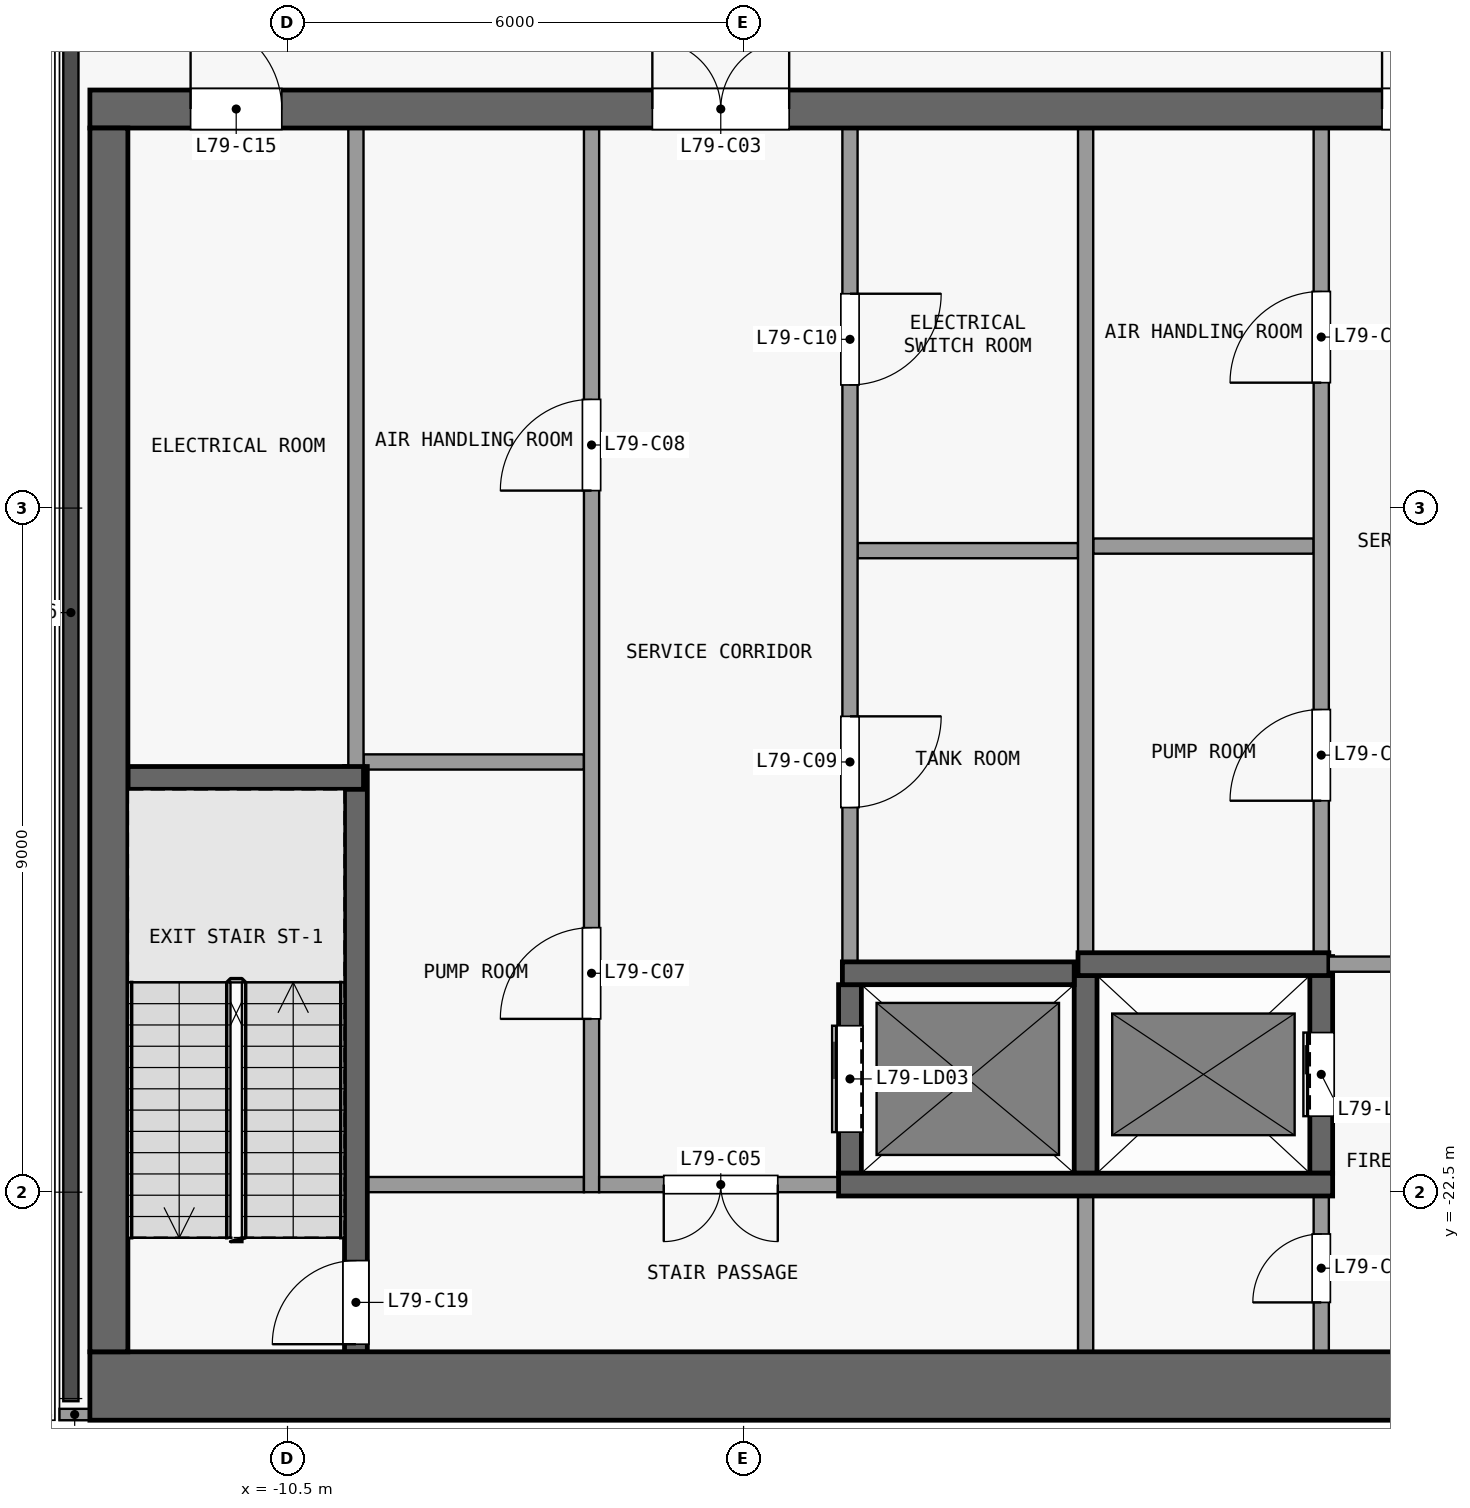
"""IFC4 building model, lengths in metres.
Left out: names, types, materials, properties, quantities, classifications, styles, units other than length and angle.
Written with IfcOpenShell. Run it as: python <this file> out.ifc"""

import sys

from ifc_helpers import new_model, si_unit, direction, frame, frame_2d, origin, place, context, subcontext, project, spatial, rectangle, extrude, element, fill, save


model = new_model("IFC4")
c1 = context("Model", 3, precision=1e-05, world=origin(), true_north=direction((0.0, 1.0)))
c2 = subcontext(c1, "Body", "Model", "MODEL_VIEW")
j1 = project(units=[si_unit("LENGTHUNIT", "METRE"), si_unit("PLANEANGLEUNIT", "RADIAN")], contexts=[c1])
p1 = place(None, origin())
s1 = spatial("IfcSite", under=j1, at=p1, CompositionType="ELEMENT")
p2 = place(p1, origin())
s2 = spatial("IfcBuilding", under=s1, at=p2, CompositionType="ELEMENT")
p3 = place(p2, frame((0.0, 0.0, 312.2)))
s3 = spatial("IfcBuildingStorey", under=s2, at=p3, CompositionType="ELEMENT", Elevation=312.2)
p4 = place(p3, frame((-13.1, -25.05, 0.0), z_axis=(0.0, 0.0, 1.0), x_axis=(1.0, 0.0, 0.0)))
e1 = element("IfcWall", 1, at=p4, inside=s3, PredefinedType="SHEAR", context=c2, shape_type="SweptSolid", body=[
    extrude(rectangle(XDim=26.2, YDim=0.9, at=frame_2d((13.1, 0.0))), origin(), (0.0, 0.0, 1.0), 4.2),
])
p5 = place(p3, frame((-13.1, -8.25, 0.0), z_axis=(0.0, 0.0, 1.0), x_axis=(1.0, 0.0, 0.0)))
e2 = element("IfcWall", 2, at=p5, inside=s3, PredefinedType="SHEAR", context=c2, shape_type="SweptSolid", body=[
    extrude(rectangle(XDim=26.2, YDim=0.5, at=frame_2d((13.1, 0.0))), origin(), (0.0, 0.0, 1.0), 4.2),
])
p6 = place(p5, frame((7.4, 0.0, 0.0)))
e3 = element("IfcOpeningElement", 3, at=p6, cuts=e2, PredefinedType="OPENING", context=c2, shape_type="SweptSolid", body=[
    extrude(rectangle(XDim=1.8, YDim=2.1, at=frame_2d((0.9, 1.05))), frame((0.0, 0.26, 0.0), z_axis=(0.0, -1.0, 0.0), x_axis=(1.0, 0.0, 0.0)), (0.0, 0.0, 1.0), 0.52),
])
p7 = place(p5, frame((17.0, 0.0, 0.0)))
e4 = element("IfcOpeningElement", 4, at=p7, cuts=e2, PredefinedType="OPENING", context=c2, shape_type="SweptSolid", body=[
    extrude(rectangle(XDim=1.8, YDim=2.1, at=frame_2d((0.9, 1.05))), frame((0.0, 0.26, 0.0), z_axis=(0.0, -1.0, 0.0), x_axis=(1.0, 0.0, 0.0)), (0.0, 0.0, 1.0), 0.52),
])
p8 = place(p5, frame((1.325, 0.0, 0.0)))
e5 = element("IfcOpeningElement", 5, at=p8, cuts=e2, PredefinedType="OPENING", context=c2, shape_type="SweptSolid", body=[
    extrude(rectangle(XDim=1.2, YDim=2.1, at=frame_2d((0.6, 1.05))), frame((0.0, 0.26, 0.0), z_axis=(0.0, -1.0, 0.0), x_axis=(1.0, 0.0, 0.0)), (0.0, 0.0, 1.0), 0.52),
])
p9 = place(p5, frame((22.975, 0.0, 0.0)))
e6 = element("IfcOpeningElement", 6, at=p9, cuts=e2, PredefinedType="OPENING", context=c2, shape_type="SweptSolid", body=[
    extrude(rectangle(XDim=0.9, YDim=2.1, at=frame_2d((0.45, 1.05))), frame((0.0, 0.26, 0.0), z_axis=(0.0, -1.0, 0.0), x_axis=(1.0, 0.0, 0.0)), (0.0, 0.0, 1.0), 0.52),
])
p10 = place(p3, frame((-12.85, -24.6, 0.0), z_axis=(0.0, 0.0, 1.0), x_axis=(0.0, 1.0, 0.0)))
e7 = element("IfcWall", 7, at=p10, inside=s3, PredefinedType="SHEAR", context=c2, shape_type="SweptSolid", body=[
    extrude(rectangle(XDim=16.1, YDim=0.5, at=frame_2d((8.05, 0.0))), origin(), (0.0, 0.0, 1.0), 4.2),
])
p11 = place(p3, frame((-9.45, -22.4, 0.0), z_axis=(0.0, 0.0, 1.0), x_axis=(1.0, 0.0, 0.0)))
e8 = element("IfcWall", 8, at=p11, inside=s3, PredefinedType="PARTITIONING", context=c2, shape_type="SweptSolid", body=[
    extrude(rectangle(XDim=2.85, YDim=0.2, at=frame_2d((1.425, 0.0))), origin(), (0.0, 0.0, 1.0), 4.2),
])
p12 = place(p3, frame((-3.25, -22.4, 0.0), z_axis=(0.0, 0.0, 1.0), x_axis=(-1.0, 0.0, 0.0)))
e9 = element("IfcWall", 9, at=p12, inside=s3, PredefinedType="PARTITIONING", context=c2, shape_type="SweptSolid", body=[
    extrude(rectangle(XDim=3.15, YDim=0.2, at=frame_2d((1.575, 0.0))), origin(), (0.0, 0.0, 1.0), 4.2),
])
p13 = place(p12, frame((0.8, 0.0, 0.0)))
e10 = element("IfcOpeningElement", 10, at=p13, cuts=e9, PredefinedType="OPENING", context=c2, shape_type="SweptSolid", body=[
    extrude(rectangle(XDim=1.5, YDim=2.1, at=frame_2d((0.75, 1.05))), frame((0.0, 0.11, 0.0), z_axis=(0.0, -1.0, 0.0), x_axis=(1.0, 0.0, 0.0)), (0.0, 0.0, 1.0), 0.22),
])
p14 = place(p3, frame((-3.25, -22.4, 0.0), z_axis=(0.0, 0.0, 1.0), x_axis=(1.0, 0.0, 0.0)))
e11 = element("IfcWall", 11, at=p14, inside=s3, PredefinedType="SHEAR", context=c2, shape_type="SweptSolid", body=[
    extrude(rectangle(XDim=6.5, YDim=0.3, at=frame_2d((3.25, 0.0))), origin(), (0.0, 0.0, 1.0), 4.2),
])
p15 = place(p3, frame((-3.2, -19.62, 0.0), z_axis=(0.0, 0.0, 1.0), x_axis=(1.0, 0.0, 0.0)))
e12 = element("IfcWall", 12, at=p15, inside=s3, PredefinedType="SHEAR", context=c2, shape_type="SweptSolid", body=[
    extrude(rectangle(XDim=3.05, YDim=0.3, at=frame_2d((1.525, 0.0))), origin(), (0.0, 0.0, 1.0), 4.2),
])
p16 = place(p3, frame((-0.1, -19.5, 0.0), z_axis=(0.0, 0.0, 1.0), x_axis=(1.0, 0.0, 0.0)))
e13 = element("IfcWall", 13, at=p16, inside=s3, PredefinedType="SHEAR", context=c2, shape_type="SweptSolid", body=[
    extrude(rectangle(XDim=3.3, YDim=0.3, at=frame_2d((1.65, 0.0))), origin(), (0.0, 0.0, 1.0), 4.2),
])
p17 = place(p3, frame((6.4, -19.5, 0.0), z_axis=(0.0, 0.0, 1.0), x_axis=(-1.0, 0.0, 0.0)))
e14 = element("IfcWall", 14, at=p17, inside=s3, PredefinedType="PARTITIONING", context=c2, shape_type="SweptSolid", body=[
    extrude(rectangle(XDim=3.2, YDim=0.2, at=frame_2d((1.6, 0.0))), origin(), (0.0, 0.0, 1.0), 4.2),
])
p18 = place(p17, frame((0.85, 0.0, 0.0)))
e15 = element("IfcOpeningElement", 15, at=p18, cuts=e14, PredefinedType="OPENING", context=c2, shape_type="SweptSolid", body=[
    extrude(rectangle(XDim=1.5, YDim=2.1, at=frame_2d((0.75, 1.05))), frame((0.0, 0.11, 0.0), z_axis=(0.0, -1.0, 0.0), x_axis=(1.0, 0.0, 0.0)), (0.0, 0.0, 1.0), 0.22),
])
p19 = place(p3, frame((-12.6, -17.05, 0.0), z_axis=(0.0, 0.0, 1.0), x_axis=(1.0, 0.0, 0.0)))
e16 = element("IfcWall", 16, at=p19, inside=s3, PredefinedType="SHEAR", context=c2, shape_type="SweptSolid", body=[
    extrude(rectangle(XDim=3.1, YDim=0.3, at=frame_2d((1.55, 0.0))), origin(), (0.0, 0.0, 1.0), 4.2),
])
for number, where, z_axis, x_axis in (
    (17, (-9.5, -16.84, 0.0), (0.0, 0.0, 1.0), (1.0, 0.0, 0.0)),
    (18, (-3.0, -14.06, 0.0), (0.0, 0.0, 1.0), (1.0, 0.0, 0.0)),
    (19, (0.1, -14.0, 0.0), (0.0, 0.0, 1.0), (1.0, 0.0, 0.0)),
):
    element("IfcWall", number, at=place(p3, frame(where, z_axis=z_axis, x_axis=x_axis)), inside=s3, PredefinedType="PARTITIONING", context=c2, shape_type="SweptSolid", body=[
        extrude(rectangle(XDim=2.9, YDim=0.2, at=frame_2d((1.45, 0.0))), origin(), (0.0, 0.0, 1.0), 4.2),
    ])
p20 = place(p3, frame((-9.6, -24.6, 0.0), z_axis=(0.0, 0.0, 1.0), x_axis=(0.0, 1.0, 0.0)))
e20 = element("IfcWall", 20, at=p20, inside=s3, PredefinedType="SHEAR", context=c2, shape_type="SweptSolid", body=[
    extrude(rectangle(XDim=7.7, YDim=0.3, at=frame_2d((3.85, 0.0))), origin(), (0.0, 0.0, 1.0), 4.2),
])
p21 = place(p20, frame((0.1, 0.0, 0.0)))
e21 = element("IfcOpeningElement", 21, at=p21, cuts=e20, PredefinedType="OPENING", context=c2, shape_type="SweptSolid", body=[
    extrude(rectangle(XDim=1.1, YDim=2.1, at=frame_2d((0.55, 1.05))), frame((0.0, 0.16, 0.0), z_axis=(0.0, -1.0, 0.0), x_axis=(1.0, 0.0, 0.0)), (0.0, 0.0, 1.0), 0.32),
])
p22 = place(p3, frame((-9.6, -16.9, 0.0), z_axis=(0.0, 0.0, 1.0), x_axis=(0.0, 1.0, 0.0)))
e22 = element("IfcWall", 22, at=p22, inside=s3, PredefinedType="PARTITIONING", context=c2, shape_type="SweptSolid", body=[
    extrude(rectangle(XDim=8.4, YDim=0.2, at=frame_2d((4.2, 0.0))), origin(), (0.0, 0.0, 1.0), 4.2),
])
p23 = place(p3, frame((-6.5, -22.5, 0.0), z_axis=(0.0, 0.0, 1.0), x_axis=(0.0, 1.0, 0.0)))
e23 = element("IfcWall", 23, at=p23, inside=s3, PredefinedType="PARTITIONING", context=c2, shape_type="SweptSolid", body=[
    extrude(rectangle(XDim=14.0, YDim=0.2, at=frame_2d((7.0, 0.0))), origin(), (0.0, 0.0, 1.0), 4.2),
])
p24 = place(p23, frame((2.28, 0.0, 0.0)))
e24 = element("IfcOpeningElement", 24, at=p24, cuts=e23, PredefinedType="OPENING", context=c2, shape_type="SweptSolid", body=[
    extrude(rectangle(XDim=1.2, YDim=2.1, at=frame_2d((0.6, 1.05))), frame((0.0, 0.11, 0.0), z_axis=(0.0, -1.0, 0.0), x_axis=(1.0, 0.0, 0.0)), (0.0, 0.0, 1.0), 0.22),
])
p25 = place(p23, frame((9.23, 0.0, 0.0)))
e25 = element("IfcOpeningElement", 25, at=p25, cuts=e23, PredefinedType="OPENING", context=c2, shape_type="SweptSolid", body=[
    extrude(rectangle(XDim=1.2, YDim=2.1, at=frame_2d((0.6, 1.05))), frame((0.0, 0.11, 0.0), z_axis=(0.0, -1.0, 0.0), x_axis=(1.0, 0.0, 0.0)), (0.0, 0.0, 1.0), 0.22),
])
p26 = place(p3, frame((-3.1, -22.25, 0.0), z_axis=(0.0, 0.0, 1.0), x_axis=(0.0, 1.0, 0.0)))
e26 = element("IfcWall", 26, at=p26, inside=s3, PredefinedType="SHEAR", context=c2, shape_type="SweptSolid", body=[
    extrude(rectangle(XDim=2.48, YDim=0.3, at=frame_2d((1.24, 0.0))), origin(), (0.0, 0.0, 1.0), 4.2),
])
p27 = place(p26, frame((0.54, 0.0, 0.0)))
e27 = element("IfcOpeningElement", 27, at=p27, cuts=e26, PredefinedType="OPENING", context=c2, shape_type="SweptSolid", body=[
    extrude(rectangle(XDim=1.4, YDim=2.1, at=frame_2d((0.7, 1.05))), frame((0.0, 0.16, 0.0), z_axis=(0.0, -1.0, 0.0), x_axis=(1.0, 0.0, 0.0)), (0.0, 0.0, 1.0), 0.32),
])
p28 = place(p3, frame((-3.1, -8.5, 0.0), z_axis=(0.0, 0.0, 1.0), x_axis=(0.0, -1.0, 0.0)))
e28 = element("IfcWall", 28, at=p28, inside=s3, PredefinedType="PARTITIONING", context=c2, shape_type="SweptSolid", body=[
    extrude(rectangle(XDim=10.97, YDim=0.2, at=frame_2d((5.485, 0.0))), origin(), (0.0, 0.0, 1.0), 4.2),
])
p29 = place(p28, frame((7.74, 0.0, 0.0)))
e29 = element("IfcOpeningElement", 29, at=p29, cuts=e28, PredefinedType="OPENING", context=c2, shape_type="SweptSolid", body=[
    extrude(rectangle(XDim=1.2, YDim=2.1, at=frame_2d((0.6, 1.05))), frame((0.0, 0.11, 0.0), z_axis=(0.0, -1.0, 0.0), x_axis=(1.0, 0.0, 0.0)), (0.0, 0.0, 1.0), 0.22),
])
p30 = place(p28, frame((2.18, 0.0, 0.0)))
e30 = element("IfcOpeningElement", 30, at=p30, cuts=e28, PredefinedType="OPENING", context=c2, shape_type="SweptSolid", body=[
    extrude(rectangle(XDim=1.2, YDim=2.1, at=frame_2d((0.6, 1.05))), frame((0.0, 0.11, 0.0), z_axis=(0.0, -1.0, 0.0), x_axis=(1.0, 0.0, 0.0)), (0.0, 0.0, 1.0), 0.22),
])
p31 = place(p3, frame((0.0, -24.6, 0.0), z_axis=(0.0, 0.0, 1.0), x_axis=(0.0, 1.0, 0.0)))
e31 = element("IfcWall", 31, at=p31, inside=s3, PredefinedType="PARTITIONING", context=c2, shape_type="SweptSolid", body=[
    extrude(rectangle(XDim=2.05, YDim=0.2, at=frame_2d((1.025, 0.0))), origin(), (0.0, 0.0, 1.0), 4.2),
])
p32 = place(p3, frame((0.0, -22.25, 0.0), z_axis=(0.0, 0.0, 1.0), x_axis=(0.0, 1.0, 0.0)))
e32 = element("IfcWall", 32, at=p32, inside=s3, PredefinedType="SHEAR", context=c2, shape_type="SweptSolid", body=[
    extrude(rectangle(XDim=2.6, YDim=0.3, at=frame_2d((1.3, 0.0))), origin(), (0.0, 0.0, 1.0), 4.2),
])
p33 = place(p3, frame((0.0, -19.35, 0.0), z_axis=(0.0, 0.0, 1.0), x_axis=(0.0, 1.0, 0.0)))
e33 = element("IfcWall", 33, at=p33, inside=s3, PredefinedType="PARTITIONING", context=c2, shape_type="SweptSolid", body=[
    extrude(rectangle(XDim=10.85, YDim=0.2, at=frame_2d((5.425, 0.0))), origin(), (0.0, 0.0, 1.0), 4.2),
])
p34 = place(p3, frame((3.1, -24.6, 0.0), z_axis=(0.0, 0.0, 1.0), x_axis=(0.0, 1.0, 0.0)))
e34 = element("IfcWall", 34, at=p34, inside=s3, PredefinedType="PARTITIONING", context=c2, shape_type="SweptSolid", body=[
    extrude(rectangle(XDim=2.05, YDim=0.2, at=frame_2d((1.025, 0.0))), origin(), (0.0, 0.0, 1.0), 4.2),
])
p35 = place(p34, frame((0.65, 0.0, 0.0)))
e35 = element("IfcOpeningElement", 35, at=p35, cuts=e34, PredefinedType="OPENING", context=c2, shape_type="SweptSolid", body=[
    extrude(rectangle(XDim=0.9, YDim=2.1, at=frame_2d((0.45, 1.05))), frame((0.0, 0.11, 0.0), z_axis=(0.0, -1.0, 0.0), x_axis=(1.0, 0.0, 0.0)), (0.0, 0.0, 1.0), 0.22),
])
p36 = place(p3, frame((3.1, -22.25, 0.0), z_axis=(0.0, 0.0, 1.0), x_axis=(0.0, 1.0, 0.0)))
e36 = element("IfcWall", 36, at=p36, inside=s3, PredefinedType="SHEAR", context=c2, shape_type="SweptSolid", body=[
    extrude(rectangle(XDim=2.85, YDim=0.3, at=frame_2d((1.425, 0.0))), origin(), (0.0, 0.0, 1.0), 4.2),
])
p37 = place(p36, frame((0.75, 0.0, 0.0)))
e37 = element("IfcOpeningElement", 37, at=p37, cuts=e36, PredefinedType="OPENING", context=c2, shape_type="SweptSolid", body=[
    extrude(rectangle(XDim=1.1, YDim=2.1, at=frame_2d((0.55, 1.05))), frame((0.0, 0.16, 0.0), z_axis=(0.0, -1.0, 0.0), x_axis=(1.0, 0.0, 0.0)), (0.0, 0.0, 1.0), 0.32),
])
p38 = place(p3, frame((3.1, -19.6, 0.0), z_axis=(0.0, 0.0, 1.0), x_axis=(0.0, 1.0, 0.0)))
e38 = element("IfcWall", 38, at=p38, inside=s3, PredefinedType="PARTITIONING", context=c2, shape_type="SweptSolid", body=[
    extrude(rectangle(XDim=11.1, YDim=0.2, at=frame_2d((5.55, 0.0))), origin(), (0.0, 0.0, 1.0), 4.2),
])
p39 = place(p38, frame((2.25, 0.0, 0.0)))
e39 = element("IfcOpeningElement", 39, at=p39, cuts=e38, PredefinedType="OPENING", context=c2, shape_type="SweptSolid", body=[
    extrude(rectangle(XDim=1.2, YDim=2.1, at=frame_2d((0.6, 1.05))), frame((0.0, 0.11, 0.0), z_axis=(0.0, -1.0, 0.0), x_axis=(1.0, 0.0, 0.0)), (0.0, 0.0, 1.0), 0.22),
])
p40 = place(p38, frame((7.75, 0.0, 0.0)))
e40 = element("IfcOpeningElement", 40, at=p40, cuts=e38, PredefinedType="OPENING", context=c2, shape_type="SweptSolid", body=[
    extrude(rectangle(XDim=1.2, YDim=2.1, at=frame_2d((0.6, 1.05))), frame((0.0, 0.11, 0.0), z_axis=(0.0, -1.0, 0.0), x_axis=(1.0, 0.0, 0.0)), (0.0, 0.0, 1.0), 0.22),
])
p41 = place(p3, frame((-13.1, -25.425, 0.0), z_axis=(0.0, 0.0, 1.0), x_axis=(-1.0, 0.0, 0.0)))
e41 = element("IfcWall", 41, at=p41, inside=s3, PredefinedType="SOLIDWALL", context=c2, shape_type="SweptSolid", body=[
    extrude(rectangle(XDim=0.4, YDim=0.15, at=frame_2d((0.2, 0.0))), origin(), (0.0, 0.0, 1.0), 4.2),
])
p42 = place(p37, origin())
e42 = element("IfcDoor", 42, at=p42, inside=s3, OperationType="DOUBLE_DOOR_SLIDING", PredefinedType="DOOR", context=c2, shape_type="SweptSolid", body=[
    extrude(rectangle(XDim=1.1, YDim=2.1, at=frame_2d((0.55, 1.05))), frame((0.0, 0.025, 0.0), z_axis=(0.0, -1.0, 0.0), x_axis=(1.0, 0.0, 0.0)), (0.0, 0.0, 1.0), 0.05),
])
fill(e37, e42)
p43 = place(p27, origin())
e43 = element("IfcDoor", 43, at=p43, inside=s3, OperationType="DOUBLE_DOOR_SLIDING", PredefinedType="DOOR", context=c2, shape_type="SweptSolid", body=[
    extrude(rectangle(XDim=1.4, YDim=2.1, at=frame_2d((0.7, 1.05))), frame((0.0, 0.025, 0.0), z_axis=(0.0, -1.0, 0.0), x_axis=(1.0, 0.0, 0.0)), (0.0, 0.0, 1.0), 0.05),
])
fill(e27, e43)
p44 = place(p6, origin())
e44 = element("IfcDoor", 44, at=p44, inside=s3, OperationType="DOUBLE_DOOR_SINGLE_SWING", PredefinedType="DOOR", context=c2, shape_type="SweptSolid", body=[
    extrude(rectangle(XDim=1.8, YDim=2.1, at=frame_2d((0.9, 1.05))), frame((0.0, 0.025, 0.0), z_axis=(0.0, -1.0, 0.0), x_axis=(1.0, 0.0, 0.0)), (0.0, 0.0, 1.0), 0.05),
])
fill(e3, e44)
p45 = place(p7, origin())
e45 = element("IfcDoor", 45, at=p45, inside=s3, OperationType="DOUBLE_DOOR_SINGLE_SWING", PredefinedType="DOOR", context=c2, shape_type="SweptSolid", body=[
    extrude(rectangle(XDim=1.8, YDim=2.1, at=frame_2d((0.9, 1.05))), frame((0.0, 0.025, 0.0), z_axis=(0.0, -1.0, 0.0), x_axis=(1.0, 0.0, 0.0)), (0.0, 0.0, 1.0), 0.05),
])
fill(e4, e45)
p46 = place(p13, origin())
e46 = element("IfcDoor", 46, at=p46, inside=s3, OperationType="DOUBLE_DOOR_SINGLE_SWING", PredefinedType="DOOR", context=c2, shape_type="SweptSolid", body=[
    extrude(rectangle(XDim=1.5, YDim=2.1, at=frame_2d((0.75, 1.05))), frame((0.0, 0.025, 0.0), z_axis=(0.0, -1.0, 0.0), x_axis=(1.0, 0.0, 0.0)), (0.0, 0.0, 1.0), 0.05),
])
fill(e10, e46)
p47 = place(p24, origin())
e47 = element("IfcDoor", 47, at=p47, inside=s3, OperationType="SINGLE_SWING_LEFT", PredefinedType="DOOR", context=c2, shape_type="SweptSolid", body=[
    extrude(rectangle(XDim=1.2, YDim=2.1, at=frame_2d((0.6, 1.05))), frame((0.0, 0.025, 0.0), z_axis=(0.0, -1.0, 0.0), x_axis=(1.0, 0.0, 0.0)), (0.0, 0.0, 1.0), 0.05),
])
fill(e24, e47)
p48 = place(p25, origin())
e48 = element("IfcDoor", 48, at=p48, inside=s3, OperationType="SINGLE_SWING_LEFT", PredefinedType="DOOR", context=c2, shape_type="SweptSolid", body=[
    extrude(rectangle(XDim=1.2, YDim=2.1, at=frame_2d((0.6, 1.05))), frame((0.0, 0.025, 0.0), z_axis=(0.0, -1.0, 0.0), x_axis=(1.0, 0.0, 0.0)), (0.0, 0.0, 1.0), 0.05),
])
fill(e25, e48)
p49 = place(p29, origin())
e49 = element("IfcDoor", 49, at=p49, inside=s3, OperationType="SINGLE_SWING_LEFT", PredefinedType="DOOR", context=c2, shape_type="SweptSolid", body=[
    extrude(rectangle(XDim=1.2, YDim=2.1, at=frame_2d((0.6, 1.05))), frame((0.0, 0.025, 0.0), z_axis=(0.0, -1.0, 0.0), x_axis=(1.0, 0.0, 0.0)), (0.0, 0.0, 1.0), 0.05),
])
fill(e29, e49)
p50 = place(p30, origin())
e50 = element("IfcDoor", 50, at=p50, inside=s3, OperationType="SINGLE_SWING_LEFT", PredefinedType="DOOR", context=c2, shape_type="SweptSolid", body=[
    extrude(rectangle(XDim=1.2, YDim=2.1, at=frame_2d((0.6, 1.05))), frame((0.0, 0.025, 0.0), z_axis=(0.0, -1.0, 0.0), x_axis=(1.0, 0.0, 0.0)), (0.0, 0.0, 1.0), 0.05),
])
fill(e30, e50)
p51 = place(p39, origin())
e51 = element("IfcDoor", 51, at=p51, inside=s3, OperationType="SINGLE_SWING_LEFT", PredefinedType="DOOR", context=c2, shape_type="SweptSolid", body=[
    extrude(rectangle(XDim=1.2, YDim=2.1, at=frame_2d((0.6, 1.05))), frame((0.0, 0.025, 0.0), z_axis=(0.0, -1.0, 0.0), x_axis=(1.0, 0.0, 0.0)), (0.0, 0.0, 1.0), 0.05),
])
fill(e39, e51)
p52 = place(p40, origin())
e52 = element("IfcDoor", 52, at=p52, inside=s3, OperationType="SINGLE_SWING_LEFT", PredefinedType="DOOR", context=c2, shape_type="SweptSolid", body=[
    extrude(rectangle(XDim=1.2, YDim=2.1, at=frame_2d((0.6, 1.05))), frame((0.0, 0.025, 0.0), z_axis=(0.0, -1.0, 0.0), x_axis=(1.0, 0.0, 0.0)), (0.0, 0.0, 1.0), 0.05),
])
fill(e40, e52)
p53 = place(p8, origin())
e53 = element("IfcDoor", 53, at=p53, inside=s3, OperationType="SINGLE_SWING_LEFT", PredefinedType="DOOR", context=c2, shape_type="SweptSolid", body=[
    extrude(rectangle(XDim=1.2, YDim=2.1, at=frame_2d((0.6, 1.05))), frame((0.0, 0.025, 0.0), z_axis=(0.0, -1.0, 0.0), x_axis=(1.0, 0.0, 0.0)), (0.0, 0.0, 1.0), 0.05),
])
fill(e5, e53)
p54 = place(p35, origin())
e54 = element("IfcDoor", 54, at=p54, inside=s3, OperationType="SINGLE_SWING_LEFT", PredefinedType="DOOR", context=c2, shape_type="SweptSolid", body=[
    extrude(rectangle(XDim=0.9, YDim=2.1, at=frame_2d((0.45, 1.05))), frame((0.0, 0.025, 0.0), z_axis=(0.0, -1.0, 0.0), x_axis=(1.0, 0.0, 0.0)), (0.0, 0.0, 1.0), 0.05),
])
fill(e35, e54)
p55 = place(p21, origin())
e55 = element("IfcDoor", 55, at=p55, inside=s3, OperationType="SINGLE_SWING_LEFT", PredefinedType="DOOR", context=c2, shape_type="SweptSolid", body=[
    extrude(rectangle(XDim=1.1, YDim=2.1, at=frame_2d((0.55, 1.05))), frame((0.0, 0.025, 0.0), z_axis=(0.0, -1.0, 0.0), x_axis=(1.0, 0.0, 0.0)), (0.0, 0.0, 1.0), 0.05),
])
fill(e21, e55)
save(model, sys.argv[1])
